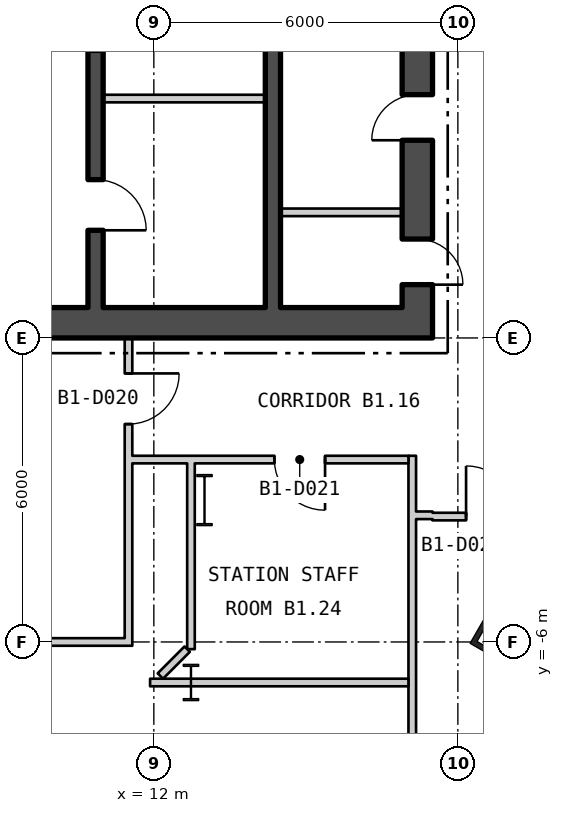
"""IFC4 building model, lengths in metres.
Left out: names, types, materials, properties, quantities, classifications, styles, units other than length and angle.
Written with IfcOpenShell. Run it as: python <this file> out.ifc"""

import sys

from ifc_helpers import new_model, si_unit, direction, frame, frame_2d, origin, origin_2d, place, context, subcontext, project, spatial, rectangle, hollow_rectangle, i_section, extrude, element, fill, save


model = new_model("IFC4")
c1 = context("Model", 3, precision=1e-05, world=origin(), true_north=direction((0.0, 1.0)))
c2 = subcontext(c1, "Body", "Model", "MODEL_VIEW")
j1 = project(units=[si_unit("LENGTHUNIT", "METRE"), si_unit("PLANEANGLEUNIT", "RADIAN")], contexts=[c1])
p1 = place(None, origin())
s1 = spatial("IfcSite", under=j1, at=p1, CompositionType="ELEMENT")
p2 = place(p1, origin())
s2 = spatial("IfcBuilding", under=s1, at=p2, CompositionType="ELEMENT")
p3 = place(p2, frame((0.0, 0.0, -5.7)))
s3 = spatial("IfcBuildingStorey", under=s2, at=p3, CompositionType="ELEMENT", Elevation=-5.7)
p4 = place(p3, frame((19.061, -5.807, 0.0), z_axis=(0.0, 0.0, 1.0), x_axis=(0.5, 0.866025403784, 0.0)))
e1 = element("IfcColumn", 1, at=p4, inside=s3, PredefinedType="COLUMN", context=c2, shape_type="SweptSolid", body=[
    extrude(hollow_rectangle(XDim=1.2, YDim=1.2, WallThickness=0.1, at=origin_2d()), origin(), (0.0, 0.0, 1.0), 5.7),
])
p5 = place(p3, frame((13.0, -3.2, 0.0), z_axis=(0.0, 0.0, 1.0), x_axis=(1.0, 0.0, 0.0)))
e2 = element("IfcColumn", 2, at=p5, inside=s3, PredefinedType="COLUMN", context=c2, shape_type="SweptSolid", body=[
    extrude(i_section(OverallWidth=0.302, OverallDepth=1.008, WebThickness=0.021, FlangeThickness=0.04, at=origin_2d()), origin(), (0.0, 0.0, 1.0), 5.7),
])
p6 = place(p3, frame((12.733, -6.8, 0.0), z_axis=(0.0, 0.0, 1.0), x_axis=(1.0, 0.0, 0.0)))
e3 = element("IfcColumn", 3, at=p6, inside=s3, PredefinedType="COLUMN", context=c2, shape_type="SweptSolid", body=[
    extrude(i_section(OverallWidth=0.304, OverallDepth=0.716, WebThickness=0.021, FlangeThickness=0.04, at=origin_2d()), origin(), (0.0, 0.0, 1.0), 5.25),
])
p7 = place(p3, frame((-17.5, 0.3, 0.0), z_axis=(0.0, 0.0, 1.0), x_axis=(1.0, 0.0, 0.0)))
e4 = element("IfcWall", 4, at=p7, inside=s3, PredefinedType="SHEAR", context=c2, shape_type="SweptSolid", body=[
    extrude(rectangle(XDim=35.0, YDim=0.6, at=frame_2d((17.5, 0.0))), origin(), (0.0, 0.0, 1.0), 5.25),
])
p8 = place(p7, frame((12.0, 0.0, 0.0)))
e5 = element("IfcOpeningElement", 5, at=p8, cuts=e4, PredefinedType="OPENING", context=c2, shape_type="SweptSolid", body=[
    extrude(rectangle(XDim=1.8, YDim=2.4, at=frame_2d((0.9, 1.2))), frame((0.0, 0.31, 0.0), z_axis=(0.0, -1.0, 0.0), x_axis=(1.0, 0.0, 0.0)), (0.0, 0.0, 1.0), 0.62),
])
p9 = place(p7, frame((22.0, 0.0, 0.0)))
e6 = element("IfcOpeningElement", 6, at=p9, cuts=e4, PredefinedType="OPENING", context=c2, shape_type="SweptSolid", body=[
    extrude(rectangle(XDim=1.8, YDim=2.4, at=frame_2d((0.9, 1.2))), frame((0.0, 0.31, 0.0), z_axis=(0.0, -1.0, 0.0), x_axis=(1.0, 0.0, 0.0)), (0.0, 0.0, 1.0), 0.62),
])
p10 = place(p3, frame((17.2, 0.6, 0.0), z_axis=(0.0, 0.0, 1.0), x_axis=(0.0, 1.0, 0.0)))
e7 = element("IfcWall", 7, at=p10, inside=s3, PredefinedType="SHEAR", context=c2, shape_type="SweptSolid", body=[
    extrude(rectangle(XDim=16.8, YDim=0.6, at=frame_2d((8.4, 0.0))), origin(), (0.0, 0.0, 1.0), 5.25),
])
p11 = place(p10, frame((5.7, 0.0, 0.0)))
e8 = element("IfcOpeningElement", 8, at=p11, cuts=e7, PredefinedType="OPENING", context=c2, shape_type="SweptSolid", body=[
    extrude(rectangle(XDim=1.5, YDim=2.1, at=frame_2d((0.75, 1.05))), frame((0.0, 0.31, 0.0), z_axis=(0.0, -1.0, 0.0), x_axis=(1.0, 0.0, 0.0)), (0.0, 0.0, 1.0), 0.62),
])
p12 = place(p10, frame((0.452, 0.0, 0.0)))
e9 = element("IfcOpeningElement", 9, at=p12, cuts=e7, PredefinedType="OPENING", context=c2, shape_type="SweptSolid", body=[
    extrude(rectangle(XDim=0.9, YDim=2.1, at=frame_2d((0.45, 1.05))), frame((0.0, 0.31, 0.0), z_axis=(0.0, -1.0, 0.0), x_axis=(1.0, 0.0, 0.0)), (0.0, 0.0, 1.0), 0.62),
])
p13 = place(p10, frame((3.302, 0.0, 0.0)))
e10 = element("IfcOpeningElement", 10, at=p13, cuts=e7, PredefinedType="OPENING", context=c2, shape_type="SweptSolid", body=[
    extrude(rectangle(XDim=0.9, YDim=2.1, at=frame_2d((0.45, 1.05))), frame((0.0, 0.31, 0.0), z_axis=(0.0, -1.0, 0.0), x_axis=(1.0, 0.0, 0.0)), (0.0, 0.0, 1.0), 0.62),
])
p14 = place(p10, frame((10.697, 0.0, 0.0)))
e11 = element("IfcOpeningElement", 11, at=p14, cuts=e7, PredefinedType="OPENING", context=c2, shape_type="SweptSolid", body=[
    extrude(rectangle(XDim=0.9, YDim=2.1, at=frame_2d((0.45, 1.05))), frame((0.0, 0.31, 0.0), z_axis=(0.0, -1.0, 0.0), x_axis=(1.0, 0.0, 0.0)), (0.0, 0.0, 1.0), 0.62),
])
p15 = place(p10, frame((15.4, 0.0, 0.0)))
e12 = element("IfcOpeningElement", 12, at=p15, cuts=e7, PredefinedType="OPENING", context=c2, shape_type="SweptSolid", body=[
    extrude(rectangle(XDim=1.0, YDim=2.1, at=frame_2d((0.5, 1.05))), frame((0.0, 0.31, 0.0), z_axis=(0.0, -1.0, 0.0), x_axis=(1.0, 0.0, 0.0)), (0.0, 0.0, 1.0), 0.62),
])
p16 = place(p3, frame((10.85, 0.6, 0.0), z_axis=(0.0, 0.0, 1.0), x_axis=(0.0, 1.0, 0.0)))
e13 = element("IfcWall", 13, at=p16, inside=s3, PredefinedType="SHEAR", context=c2, shape_type="SweptSolid", body=[
    extrude(rectangle(XDim=16.8, YDim=0.3, at=frame_2d((8.4, 0.0))), origin(), (0.0, 0.0, 1.0), 5.25),
])
p17 = place(p16, frame((5.075, 0.0, 0.0)))
e14 = element("IfcOpeningElement", 14, at=p17, cuts=e13, PredefinedType="OPENING", context=c2, shape_type="SweptSolid", body=[
    extrude(rectangle(XDim=1.25, YDim=2.1, at=frame_2d((0.625, 1.05))), frame((0.0, 0.16, 0.0), z_axis=(0.0, -1.0, 0.0), x_axis=(1.0, 0.0, 0.0)), (0.0, 0.0, 1.0), 0.32),
])
p18 = place(p16, frame((1.525, 0.0, 0.0)))
e15 = element("IfcOpeningElement", 15, at=p18, cuts=e13, PredefinedType="OPENING", context=c2, shape_type="SweptSolid", body=[
    extrude(rectangle(XDim=1.0, YDim=2.1, at=frame_2d((0.5, 1.05))), frame((0.0, 0.16, 0.0), z_axis=(0.0, -1.0, 0.0), x_axis=(1.0, 0.0, 0.0)), (0.0, 0.0, 1.0), 0.32),
])
p19 = place(p3, frame((14.35, 0.6, 0.0), z_axis=(0.0, 0.0, 1.0), x_axis=(0.0, 1.0, 0.0)))
e16 = element("IfcWall", 16, at=p19, inside=s3, PredefinedType="SHEAR", context=c2, shape_type="SweptSolid", body=[
    extrude(rectangle(XDim=16.8, YDim=0.3, at=frame_2d((8.4, 0.0))), origin(), (0.0, 0.0, 1.0), 5.25),
])
p20 = place(p19, frame((5.7, 0.0, 0.0)))
e17 = element("IfcOpeningElement", 17, at=p20, cuts=e16, PredefinedType="OPENING", context=c2, shape_type="SweptSolid", body=[
    extrude(rectangle(XDim=1.5, YDim=2.1, at=frame_2d((0.75, 1.05))), frame((0.0, 0.16, 0.0), z_axis=(0.0, -1.0, 0.0), x_axis=(1.0, 0.0, 0.0)), (0.0, 0.0, 1.0), 0.32),
])
p21 = place(p3, frame((11.0, 4.725, 0.0), z_axis=(0.0, 0.0, 1.0), x_axis=(1.0, 0.0, 0.0)))
e18 = element("IfcWall", 18, at=p21, inside=s3, PredefinedType="PARTITIONING", context=c2, shape_type="SweptSolid", body=[
    extrude(rectangle(XDim=3.2, YDim=0.15, at=frame_2d((1.6, 0.0))), origin(), (0.0, 0.0, 1.0), 5.25),
])
p22 = place(p3, frame((14.5, 2.479, 0.0), z_axis=(0.0, 0.0, 1.0), x_axis=(1.0, 0.0, 0.0)))
e19 = element("IfcWall", 19, at=p22, inside=s3, PredefinedType="PARTITIONING", context=c2, shape_type="SweptSolid", body=[
    extrude(rectangle(XDim=2.4, YDim=0.15, at=frame_2d((1.2, 0.0))), origin(), (0.0, 0.0, 1.0), 5.25),
])
p23 = place(p3, frame((9.125, -6.0, 0.0), z_axis=(0.0, 0.0, 1.0), x_axis=(1.0, 0.0, 0.0)))
e20 = element("IfcWall", 20, at=p23, inside=s3, PredefinedType="PARTITIONING", context=c2, shape_type="SweptSolid", body=[
    extrude(rectangle(XDim=2.3, YDim=0.15, at=frame_2d((1.15, 0.0))), origin(), (0.0, 0.0, 1.0), 5.25),
])
p24 = place(p3, frame((11.5, -6.075, 0.0), z_axis=(0.0, 0.0, 1.0), x_axis=(0.0, 1.0, 0.0)))
e21 = element("IfcWall", 21, at=p24, inside=s3, PredefinedType="PARTITIONING", context=c2, shape_type="SweptSolid", body=[
    extrude(rectangle(XDim=6.075, YDim=0.15, at=frame_2d((3.038, 0.0))), origin(), (0.0, 0.0, 1.0), 5.25),
])
p25 = place(p24, frame((4.375, 0.0, 0.0)))
e22 = element("IfcOpeningElement", 22, at=p25, cuts=e21, PredefinedType="OPENING", context=c2, shape_type="SweptSolid", body=[
    extrude(rectangle(XDim=1.0, YDim=2.1, at=frame_2d((0.5, 1.05))), frame((0.0, 0.085, 0.0), z_axis=(0.0, -1.0, 0.0), x_axis=(1.0, 0.0, 0.0)), (0.0, 0.0, 1.0), 0.17),
])
p26 = place(p3, frame((11.575, -2.4, 0.0), z_axis=(0.0, 0.0, 1.0), x_axis=(1.0, 0.0, 0.0)))
e23 = element("IfcWall", 23, at=p26, inside=s3, PredefinedType="PARTITIONING", context=c2, shape_type="SweptSolid", body=[
    extrude(rectangle(XDim=5.45, YDim=0.15, at=frame_2d((2.725, 0.0))), origin(), (0.0, 0.0, 1.0), 5.25),
])
p27 = place(p26, frame((2.804, 0.0, 0.0)))
e24 = element("IfcOpeningElement", 24, at=p27, cuts=e23, PredefinedType="OPENING", context=c2, shape_type="SweptSolid", body=[
    extrude(rectangle(XDim=1.0, YDim=2.1, at=frame_2d((0.5, 1.05))), frame((0.0, 0.085, 0.0), z_axis=(0.0, -1.0, 0.0), x_axis=(1.0, 0.0, 0.0)), (0.0, 0.0, 1.0), 0.17),
])
p28 = place(p3, frame((11.926, -6.8, 0.0), z_axis=(0.0, 0.0, 1.0), x_axis=(1.0, 0.0, 0.0)))
e25 = element("IfcWall", 25, at=p28, inside=s3, PredefinedType="PARTITIONING", context=c2, shape_type="SweptSolid", body=[
    extrude(rectangle(XDim=5.099, YDim=0.15, at=frame_2d((2.55, 0.0))), origin(), (0.0, 0.0, 1.0), 5.25),
])
p29 = place(p3, frame((12.129, -6.672, 0.0), z_axis=(0.0, 0.0, 1.0), x_axis=(0.706438754443, 0.707774177419, 0.0)))
e26 = element("IfcWall", 26, at=p29, inside=s3, PredefinedType="PARTITIONING", context=c2, shape_type="SweptSolid", body=[
    extrude(rectangle(XDim=0.749, YDim=0.15, at=frame_2d((0.374, 0.0))), origin(), (0.0, 0.0, 1.0), 5.25),
])
p30 = place(p3, frame((12.733, -6.142, 0.0), z_axis=(0.0, 0.0, 1.0), x_axis=(0.0, 1.0, 0.0)))
e27 = element("IfcWall", 27, at=p30, inside=s3, PredefinedType="PARTITIONING", context=c2, shape_type="SweptSolid", body=[
    extrude(rectangle(XDim=3.667, YDim=0.15, at=frame_2d((1.833, 0.0))), origin(), (0.0, 0.0, 1.0), 5.25),
])
p31 = place(p3, frame((17.1, -21.375, 0.0), z_axis=(0.0, 0.0, 1.0), x_axis=(0.0, 1.0, 0.0)))
e28 = element("IfcWall", 28, at=p31, inside=s3, PredefinedType="PARTITIONING", context=c2, shape_type="SweptSolid", body=[
    extrude(rectangle(XDim=19.05, YDim=0.15, at=frame_2d((9.525, 0.0))), origin(), (0.0, 0.0, 1.0), 5.25),
])
p32 = place(p3, frame((17.175, -3.5, 0.0), z_axis=(0.0, 0.0, 1.0), x_axis=(1.0, 0.0, 0.0)))
e29 = element("IfcWall", 29, at=p32, inside=s3, PredefinedType="PARTITIONING", context=c2, shape_type="SweptSolid", body=[
    extrude(rectangle(XDim=0.325, YDim=0.15, at=frame_2d((0.163, 0.0))), origin(), (0.0, 0.0, 1.0), 5.25),
])
p33 = place(p3, frame((17.5, -3.525, 0.0), z_axis=(0.0, 0.0, 1.0), x_axis=(1.0, 0.0, 0.0)))
e30 = element("IfcWall", 30, at=p33, inside=s3, PredefinedType="PARTITIONING", context=c2, shape_type="SweptSolid", body=[
    extrude(rectangle(XDim=2.325, YDim=0.15, at=frame_2d((1.163, 0.0))), origin(), (0.0, 0.0, 1.0), 5.25),
])
p34 = place(p33, frame((0.662, 0.0, 0.0)))
e31 = element("IfcOpeningElement", 31, at=p34, cuts=e30, PredefinedType="OPENING", context=c2, shape_type="SweptSolid", body=[
    extrude(rectangle(XDim=1.0, YDim=2.1, at=frame_2d((0.5, 1.05))), frame((0.0, 0.085, 0.0), z_axis=(0.0, -1.0, 0.0), x_axis=(1.0, 0.0, 0.0)), (0.0, 0.0, 1.0), 0.17),
])
p35 = place(p18, origin())
e32 = element("IfcDoor", 32, at=p35, inside=s3, OperationType="SINGLE_SWING_LEFT", PredefinedType="DOOR", context=c2, shape_type="SweptSolid", body=[
    extrude(rectangle(XDim=1.0, YDim=2.1, at=frame_2d((0.5, 1.05))), frame((0.0, 0.025, 0.0), z_axis=(0.0, -1.0, 0.0), x_axis=(1.0, 0.0, 0.0)), (0.0, 0.0, 1.0), 0.05),
])
fill(e15, e32)
p36 = place(p12, origin())
e33 = element("IfcDoor", 33, at=p36, inside=s3, OperationType="SINGLE_SWING_LEFT", PredefinedType="DOOR", context=c2, shape_type="SweptSolid", body=[
    extrude(rectangle(XDim=0.9, YDim=2.1, at=frame_2d((0.45, 1.05))), frame((0.0, 0.025, 0.0), z_axis=(0.0, -1.0, 0.0), x_axis=(1.0, 0.0, 0.0)), (0.0, 0.0, 1.0), 0.05),
])
fill(e9, e33)
p37 = place(p13, origin())
e34 = element("IfcDoor", 34, at=p37, inside=s3, OperationType="SINGLE_SWING_RIGHT", PredefinedType="DOOR", context=c2, shape_type="SweptSolid", body=[
    extrude(rectangle(XDim=0.9, YDim=2.1, at=frame_2d((0.45, 1.05))), frame((0.0, 0.025, 0.0), z_axis=(0.0, -1.0, 0.0), x_axis=(1.0, 0.0, 0.0)), (0.0, 0.0, 1.0), 0.05),
])
fill(e10, e34)
p38 = place(p25, origin())
e35 = element("IfcDoor", 35, at=p38, inside=s3, OperationType="SINGLE_SWING_RIGHT", PredefinedType="DOOR", context=c2, shape_type="SweptSolid", body=[
    extrude(rectangle(XDim=1.0, YDim=2.1, at=frame_2d((0.5, 1.05))), frame((0.0, 0.025, 0.0), z_axis=(0.0, -1.0, 0.0), x_axis=(1.0, 0.0, 0.0)), (0.0, 0.0, 1.0), 0.05),
])
fill(e22, e35)
p39 = place(p27, origin())
e36 = element("IfcDoor", 36, at=p39, inside=s3, OperationType="SINGLE_SWING_RIGHT", PredefinedType="DOOR", context=c2, shape_type="SweptSolid", body=[
    extrude(rectangle(XDim=1.0, YDim=2.1, at=frame_2d((0.5, 1.05))), frame((0.0, 0.025, 0.0), z_axis=(0.0, -1.0, 0.0), x_axis=(1.0, 0.0, 0.0)), (0.0, 0.0, 1.0), 0.05),
])
fill(e24, e36)
p40 = place(p34, origin())
e37 = element("IfcDoor", 37, at=p40, inside=s3, OperationType="SINGLE_SWING_RIGHT", PredefinedType="DOOR", context=c2, shape_type="SweptSolid", body=[
    extrude(rectangle(XDim=1.0, YDim=2.1, at=frame_2d((0.5, 1.05))), frame((0.0, 0.025, 0.0), z_axis=(0.0, -1.0, 0.0), x_axis=(1.0, 0.0, 0.0)), (0.0, 0.0, 1.0), 0.05),
])
fill(e31, e37)
save(model, sys.argv[1])
